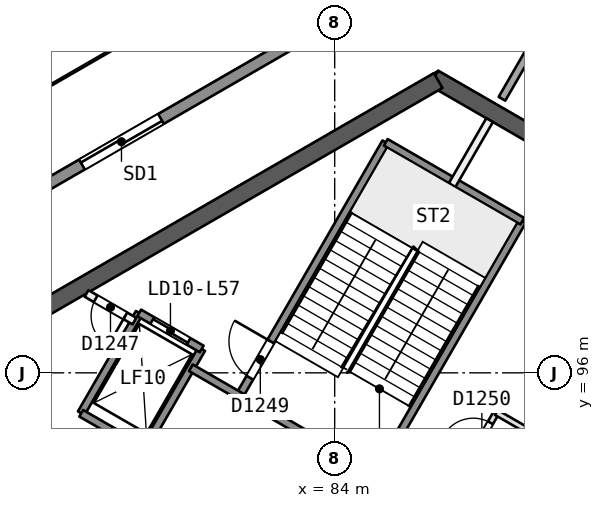
"""IFC4 building model, lengths in metres.
Left out: names, types, materials, properties, quantities, classifications, styles, units other than length and angle.
Written with IfcOpenShell. Run it as: python <this file> out.ifc"""

import sys

from ifc_helpers import new_model, si_unit, direction, frame, frame_2d, origin, place, context, subcontext, project, spatial, rectangle, extrude, element, fill, save


model = new_model("IFC4")
c1 = context("Model", 3, precision=1e-05, world=origin(), true_north=direction((0.0, 1.0)))
c2 = subcontext(c1, "Body", "Model", "MODEL_VIEW")
j1 = project(units=[si_unit("LENGTHUNIT", "METRE"), si_unit("PLANEANGLEUNIT", "RADIAN")], contexts=[c1])
p1 = place(None, origin())
s1 = spatial("IfcSite", under=j1, at=p1, CompositionType="ELEMENT")
p2 = place(p1, origin())
s2 = spatial("IfcBuilding", under=s1, at=p2, CompositionType="ELEMENT")
p3 = place(p2, frame((0.0, 0.0, 231.7)))
s3 = spatial("IfcBuildingStorey", under=s2, at=p3, CompositionType="ELEMENT", Elevation=231.7)
p4 = place(p3, frame((89.655, 101.998, 0.0), z_axis=(0.0, 0.0, 1.0), x_axis=(-0.866042179588, 0.49997094233, 0.0)))
e1 = element("IfcWall", 1, at=p4, inside=s3, PredefinedType="SHEAR", context=c2, shape_type="SweptSolid", body=[
    extrude(rectangle(XDim=3.515, YDim=0.45, at=frame_2d((1.758, 0.0))), origin(), (0.0, 0.0, 1.0), 3.7),
])
p5 = place(p3, frame((86.723, 103.69, 0.0), z_axis=(0.0, 0.0, 1.0), x_axis=(-0.866022713978, -0.500004658852, 0.0)))
e2 = element("IfcWall", 2, at=p5, inside=s3, PredefinedType="SHEAR", context=c2, shape_type="SweptSolid", body=[
    extrude(rectangle(XDim=14.203, YDim=0.45, at=frame_2d((7.102, 0.0))), origin(), (0.0, 0.0, 1.0), 3.7),
])
p6 = place(p3, frame((74.617, 96.701, 0.0), z_axis=(0.0, 0.0, 1.0), x_axis=(0.499994385119, -0.866028645513, 0.0)))
e3 = element("IfcWall", 3, at=p6, inside=s3, PredefinedType="SHEAR", context=c2, shape_type="SweptSolid", body=[
    extrude(rectangle(XDim=10.155, YDim=0.45, at=frame_2d((5.077, 0.0))), origin(), (0.0, 0.0, 1.0), 3.7),
])
p7 = place(p6, frame((8.005, 0.0, 0.0)))
e4 = element("IfcOpeningElement", 4, at=p7, cuts=e3, PredefinedType="OPENING", context=c2, shape_type="SweptSolid", body=[
    extrude(rectangle(XDim=1.2, YDim=2.1, at=frame_2d((0.6, 1.05))), frame((0.0, 0.235, 0.0), z_axis=(0.0, -1.0, 0.0), x_axis=(1.0, 0.0, 0.0)), (0.0, 0.0, 1.0), 0.471),
])
p8 = place(p3, frame((90.134, 106.211, 0.0), z_axis=(0.0, 0.0, 1.0), x_axis=(-0.500019299785, -0.866014260761, 0.0)))
e5 = element("IfcWall", 5, at=p8, inside=s3, PredefinedType="PARTITIONING", context=c2, shape_type="SweptSolid", body=[
    extrude(rectangle(XDim=3.465, YDim=0.2, at=frame_2d((1.732, 0.0))), origin(), (0.0, 0.0, 1.0), 3.3),
])
p9 = place(p3, frame((44.584, 82.563, 0.0), z_axis=(0.0, 0.0, 1.0), x_axis=(0.866023992326, 0.500002444709, 0.0)))
e6 = element("IfcWall", 6, at=p9, inside=s3, PredefinedType="SOLIDWALL", context=c2, shape_type="SweptSolid", body=[
    extrude(rectangle(XDim=50.118, YDim=0.3, at=frame_2d((25.059, 0.0))), origin(), (0.0, 0.0, 1.0), 3.3),
])
p10 = place(p9, frame((23.391, 0.0, 0.0)))
e7 = element("IfcOpeningElement", 7, at=p10, cuts=e6, PredefinedType="OPENING", context=c2, shape_type="SweptSolid", body=[
    extrude(rectangle(XDim=2.4, YDim=2.4, at=frame_2d((1.2, 1.2))), frame((0.0, 0.161, 0.0), z_axis=(0.0, -1.0, 0.0), x_axis=(1.0, 0.0, 0.0)), (0.0, 0.0, 1.0), 0.321),
])
p11 = place(p9, frame((37.835, 0.0, 0.0)))
e8 = element("IfcOpeningElement", 8, at=p11, cuts=e6, PredefinedType="OPENING", context=c2, shape_type="SweptSolid", body=[
    extrude(rectangle(XDim=2.4, YDim=2.4, at=frame_2d((1.2, 1.2))), frame((0.0, 0.161, 0.0), z_axis=(0.0, -1.0, 0.0), x_axis=(1.0, 0.0, 0.0)), (0.0, 0.0, 1.0), 0.321),
])
p12 = place(p9, frame((9.416, 0.0, 0.0)))
e9 = element("IfcOpeningElement", 9, at=p12, cuts=e6, PredefinedType="OPENING", context=c2, shape_type="SweptSolid", body=[
    extrude(rectangle(XDim=2.4, YDim=2.4, at=frame_2d((1.2, 1.2))), frame((0.0, 0.161, 0.0), z_axis=(0.0, -1.0, 0.0), x_axis=(1.0, 0.0, 0.0)), (0.0, 0.0, 1.0), 0.321),
])
p13 = place(p3, frame((87.454, 93.571, 0.0), z_axis=(0.0, 0.0, 1.0), x_axis=(0.499995408039, 0.866028054938, 0.0)))
e10 = element("IfcWall", 10, at=p13, inside=s3, PredefinedType="PARTITIONING", context=c2, shape_type="SweptSolid", body=[
    extrude(rectangle(XDim=1.6, YDim=0.15, at=frame_2d((0.8, 0.0))), origin(), (0.0, 0.0, 1.0), 3.3),
])
p14 = place(p13, frame((0.387, 0.0, 0.0)))
e11 = element("IfcOpeningElement", 11, at=p14, cuts=e10, PredefinedType="OPENING", context=c2, shape_type="SweptSolid", body=[
    extrude(rectangle(XDim=0.9, YDim=2.1, at=frame_2d((0.45, 1.05))), frame((0.0, 0.085, 0.0), z_axis=(0.0, -1.0, 0.0), x_axis=(1.0, 0.0, 0.0)), (0.0, 0.0, 1.0), 0.171),
])
p15 = place(p3, frame((85.087, 93.321, 0.0), z_axis=(0.0, 0.0, 1.0), x_axis=(0.500019787375, 0.866013979237, 0.0)))
e12 = element("IfcWall", 12, at=p15, inside=s3, PredefinedType="SOLIDWALL", context=c2, shape_type="SweptSolid", body=[
    extrude(rectangle(XDim=7.7, YDim=0.2, at=frame_2d((3.85, 0.0))), origin(), (0.0, 0.0, 1.0), 3.3),
])
p16 = place(p3, frame((87.09, 100.94, 0.0), z_axis=(0.0, 0.0, 1.0), x_axis=(0.500011643316, 0.866018681408, 0.0)))
e13 = element("IfcWall", 13, at=p16, inside=s3, PredefinedType="PARTITIONING", context=c2, shape_type="SweptSolid", body=[
    extrude(rectangle(XDim=1.973, YDim=0.2, at=frame_2d((0.987, 0.0))), origin(), (0.0, 0.0, 1.0), 3.3),
])
p17 = place(p3, frame((81.493, 95.396, 0.0), z_axis=(0.0, 0.0, 1.0), x_axis=(0.500006057782, 0.866021906294, 0.0)))
e14 = element("IfcWall", 14, at=p17, inside=s3, PredefinedType="SOLIDWALL", context=c2, shape_type="SweptSolid", body=[
    extrude(rectangle(XDim=7.7, YDim=0.2, at=frame_2d((3.85, 0.0))), origin(), (0.0, 0.0, 1.0), 3.3),
])
p18 = place(p17, frame((0.55, 0.0, 0.0)))
e15 = element("IfcOpeningElement", 15, at=p18, cuts=e14, PredefinedType="OPENING", context=c2, shape_type="SweptSolid", body=[
    extrude(rectangle(XDim=1.1, YDim=2.1, at=frame_2d((0.55, 1.05))), frame((0.0, 0.11, 0.0), z_axis=(0.0, -1.0, 0.0), x_axis=(1.0, 0.0, 0.0)), (0.0, 0.0, 1.0), 0.221),
])
for number, where, z_axis, x_axis in (
    (16, (78.976, 93.986, 0.0), (0.0, 0.0, 1.0), (0.5, 0.866, 0.0)),
    (17, (77.33, 94.936, 0.0), (0.0, 0.0, 1.0), (0.5, 0.866, 0.0)),
):
    element("IfcWall", number, at=place(p3, frame(where, z_axis=z_axis, x_axis=x_axis)), inside=s3, PredefinedType="SOLIDWALL", context=c2, shape_type="SweptSolid", body=[
        extrude(rectangle(XDim=3.05, YDim=0.2, at=frame_2d((1.525, 0.0))), origin(), (0.0, 0.0, 1.0), 3.3),
    ])
p19 = place(p3, frame((86.77, 89.486, 0.0), z_axis=(0.0, 0.0, 1.0), x_axis=(-0.86601811187, 0.500012629753, 0.0)))
e18 = element("IfcWall", 18, at=p19, inside=s3, PredefinedType="SOLIDWALL", context=c2, shape_type="SweptSolid", body=[
    extrude(rectangle(XDim=10.9, YDim=0.2, at=frame_2d((5.45, 0.0))), origin(), (0.0, 0.0, 1.0), 3.3),
])
p20 = place(p19, frame((1.75, 0.0, 0.0)))
e19 = element("IfcOpeningElement", 19, at=p20, cuts=e18, PredefinedType="OPENING", context=c2, shape_type="SweptSolid", body=[
    extrude(rectangle(XDim=1.0, YDim=2.1, at=frame_2d((0.5, 1.05))), frame((0.0, 0.11, 0.0), z_axis=(0.0, -1.0, 0.0), x_axis=(1.0, 0.0, 0.0)), (0.0, 0.0, 1.0), 0.221),
])
p21 = place(p19, frame((6.25, 0.0, 0.0)))
e20 = element("IfcOpeningElement", 20, at=p21, cuts=e18, PredefinedType="OPENING", context=c2, shape_type="SweptSolid", body=[
    extrude(rectangle(XDim=1.0, YDim=2.1, at=frame_2d((0.5, 1.05))), frame((0.0, 0.11, 0.0), z_axis=(0.0, -1.0, 0.0), x_axis=(1.0, 0.0, 0.0)), (0.0, 0.0, 1.0), 0.221),
])
p22 = place(p3, frame((89.43, 90.814, 0.0), z_axis=(0.0, 0.0, 1.0), x_axis=(-0.866018983788, 0.500011119594, 0.0)))
e21 = element("IfcWall", 21, at=p22, inside=s3, PredefinedType="SOLIDWALL", context=c2, shape_type="SweptSolid", body=[
    extrude(rectangle(XDim=10.64, YDim=0.2, at=frame_2d((5.32, 0.0))), origin(), (0.0, 0.0, 1.0), 3.3),
])
p23 = place(p22, frame((0.37, 0.0, 0.0)))
e22 = element("IfcOpeningElement", 22, at=p23, cuts=e21, PredefinedType="OPENING", context=c2, shape_type="SweptSolid", body=[
    extrude(rectangle(XDim=0.9, YDim=2.1, at=frame_2d((0.45, 1.05))), frame((0.0, 0.11, 0.0), z_axis=(0.0, -1.0, 0.0), x_axis=(1.0, 0.0, 0.0)), (0.0, 0.0, 1.0), 0.221),
])
p24 = place(p3, frame((78.73, 97.361, 0.0), z_axis=(0.0, 0.0, 1.0), x_axis=(-0.866045896294, 0.499964504253, 0.0)))
e23 = element("IfcWall", 23, at=p24, inside=s3, PredefinedType="PARTITIONING", context=c2, shape_type="SweptSolid", body=[
    extrude(rectangle(XDim=1.455, YDim=0.2, at=frame_2d((0.728, 0.0))), origin(), (0.0, 0.0, 1.0), 3.3),
])
p25 = place(p24, frame((0.278, 0.0, 0.0)))
e24 = element("IfcOpeningElement", 24, at=p25, cuts=e23, PredefinedType="OPENING", context=c2, shape_type="SweptSolid", body=[
    extrude(rectangle(XDim=0.9, YDim=2.1, at=frame_2d((0.45, 1.05))), frame((0.0, 0.11, 0.0), z_axis=(0.0, -1.0, 0.0), x_axis=(1.0, 0.0, 0.0)), (0.0, 0.0, 1.0), 0.221),
])
p26 = place(p3, frame((80.5, 96.627, 0.0), z_axis=(0.0, 0.0, 1.0), x_axis=(-0.86601224135, 0.500022797313, 0.0)))
e25 = element("IfcWall", 25, at=p26, inside=s3, PredefinedType="SOLIDWALL", context=c2, shape_type="SweptSolid", body=[
    extrude(rectangle(XDim=1.9, YDim=0.2, at=frame_2d((0.95, 0.0))), origin(), (0.0, 0.0, 1.0), 3.3),
])
p27 = place(p26, frame((0.4, 0.0, 0.0)))
e26 = element("IfcOpeningElement", 26, at=p27, cuts=e25, PredefinedType="OPENING", context=c2, shape_type="SweptSolid", body=[
    extrude(rectangle(XDim=1.1, YDim=2.1, at=frame_2d((0.55, 1.05))), frame((0.0, 0.11, 0.0), z_axis=(0.0, -1.0, 0.0), x_axis=(1.0, 0.0, 0.0)), (0.0, 0.0, 1.0), 0.221),
])
p28 = place(p3, frame((89.43, 94.278, 0.0), z_axis=(0.0, 0.0, 1.0), x_axis=(-0.865987941628, 0.500064880745, 0.0)))
e27 = element("IfcWall", 27, at=p28, inside=s3, PredefinedType="PARTITIONING", context=c2, shape_type="SweptSolid", body=[
    extrude(rectangle(XDim=1.358, YDim=0.15, at=frame_2d((0.679, 0.0))), origin(), (0.0, 0.0, 1.0), 3.3),
])
p29 = place(p3, frame((88.937, 99.99, 0.0), z_axis=(0.0, 0.0, 1.0), x_axis=(-0.866004344652, 0.500036473714, 0.0)))
e28 = element("IfcWall", 28, at=p29, inside=s3, PredefinedType="SOLIDWALL", context=c2, shape_type="SweptSolid", body=[
    extrude(rectangle(XDim=4.15, YDim=0.2, at=frame_2d((2.075, 0.0))), origin(), (0.0, 0.0, 1.0), 3.3),
])
p30 = place(p11, origin())
e29 = element("IfcDoor", 29, at=p30, inside=s3, OperationType="SLIDING_TO_RIGHT", PredefinedType="NOTDEFINED", context=c2, shape_type="SweptSolid", body=[
    extrude(rectangle(XDim=2.4, YDim=2.4, at=frame_2d((1.2, 1.2))), frame((0.0, 0.025, 0.0), z_axis=(0.0, -1.0, 0.0), x_axis=(1.0, 0.0, 0.0)), (0.0, 0.0, 1.0), 0.05),
])
fill(e8, e29)
p31 = place(p27, origin())
e30 = element("IfcDoor", 30, at=p31, inside=s3, OperationType="SLIDING_TO_RIGHT", PredefinedType="NOTDEFINED", context=c2, shape_type="SweptSolid", body=[
    extrude(rectangle(XDim=1.1, YDim=2.1, at=frame_2d((0.55, 1.05))), frame((0.0, 0.025, 0.0), z_axis=(0.0, -1.0, 0.0), x_axis=(1.0, 0.0, 0.0)), (0.0, 0.0, 1.0), 0.05),
])
fill(e26, e30)
p32 = place(p25, origin())
e31 = element("IfcDoor", 31, at=p32, inside=s3, OperationType="SINGLE_SWING_LEFT", PredefinedType="NOTDEFINED", context=c2, shape_type="SweptSolid", body=[
    extrude(rectangle(XDim=0.9, YDim=2.1, at=frame_2d((0.45, 1.05))), frame((0.0, 0.025, 0.0), z_axis=(0.0, -1.0, 0.0), x_axis=(1.0, 0.0, 0.0)), (0.0, 0.0, 1.0), 0.05),
])
fill(e24, e31)
p33 = place(p18, origin())
e32 = element("IfcDoor", 32, at=p33, inside=s3, OperationType="SINGLE_SWING_RIGHT", PredefinedType="NOTDEFINED", context=c2, shape_type="SweptSolid", body=[
    extrude(rectangle(XDim=1.1, YDim=2.1, at=frame_2d((0.55, 1.05))), frame((0.0, 0.025, 0.0), z_axis=(0.0, -1.0, 0.0), x_axis=(1.0, 0.0, 0.0)), (0.0, 0.0, 1.0), 0.05),
])
fill(e15, e32)
p34 = place(p14, origin())
e33 = element("IfcDoor", 33, at=p34, inside=s3, OperationType="SINGLE_SWING_LEFT", PredefinedType="NOTDEFINED", context=c2, shape_type="SweptSolid", body=[
    extrude(rectangle(XDim=0.9, YDim=2.1, at=frame_2d((0.45, 1.05))), frame((0.0, 0.025, 0.0), z_axis=(0.0, -1.0, 0.0), x_axis=(1.0, 0.0, 0.0)), (0.0, 0.0, 1.0), 0.05),
])
fill(e11, e33)
save(model, sys.argv[1])
